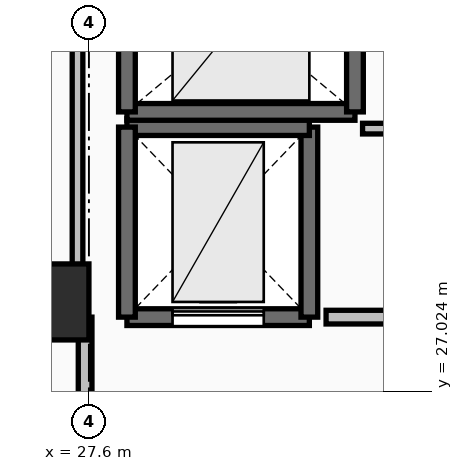
"""IFC4 building model, lengths in metres.
Left out: names, types, materials, properties, quantities, classifications, styles, units other than length and angle.
Written with IfcOpenShell. Run it as: python <this file> out.ifc"""

import sys

from ifc_helpers import new_model, si_unit, direction, frame, frame_2d, origin, origin_2d, place, context, subcontext, project, spatial, rectangle, extrude, element, fill, save


model = new_model("IFC4")
c1 = context("Model", 3, precision=1e-05, world=origin(), true_north=direction((0.0, 1.0)))
c2 = subcontext(c1, "Body", "Model", "MODEL_VIEW")
j1 = project(units=[si_unit("LENGTHUNIT", "METRE"), si_unit("PLANEANGLEUNIT", "RADIAN")], contexts=[c1])
p1 = place(None, origin())
s1 = spatial("IfcSite", under=j1, at=p1, CompositionType="ELEMENT")
p2 = place(p1, origin())
s2 = spatial("IfcBuilding", under=s1, at=p2, CompositionType="ELEMENT")
p3 = place(p2, frame((0.0, 0.0, 221.4)))
s3 = spatial("IfcBuildingStorey", under=s2, at=p3, CompositionType="ELEMENT", Elevation=221.4)
p4 = place(p3, frame((27.25, 28.2, 0.0), z_axis=(0.0, 0.0, 1.0), x_axis=(1.0, 0.0, 0.0)))
e1 = element("IfcColumn", 1, at=p4, inside=s3, PredefinedType="PILASTER", context=c2, shape_type="SweptSolid", body=[
    extrude(rectangle(XDim=0.7, YDim=1.0, at=origin_2d()), origin(), (0.0, 0.0, 1.0), 3.55),
])
p5 = place(p3, frame((28.1, 28.0, 0.0), z_axis=(0.0, 0.0, 1.0), x_axis=(1.0, 0.0, 0.0)))
e2 = element("IfcWall", 2, at=p5, inside=s3, PredefinedType="SHEAR", context=c2, shape_type="SweptSolid", body=[
    extrude(rectangle(XDim=2.4, YDim=0.22, at=frame_2d((1.2, 0.0))), origin(), (0.0, 0.0, 1.0), 3.2),
])
p6 = place(p5, frame((0.6, 0.0, 0.0)))
e3 = element("IfcOpeningElement", 3, at=p6, cuts=e2, PredefinedType="OPENING", context=c2, shape_type="SweptSolid", body=[
    extrude(rectangle(XDim=1.2, YDim=2.2, at=frame_2d((0.6, 1.1))), frame((0.0, 0.125, 0.0), z_axis=(0.0, -1.0, 0.0), x_axis=(1.0, 0.0, 0.0)), (0.0, 0.0, 1.0), 0.25),
])
p7 = place(p3, frame((30.5, 28.0, 0.0), z_axis=(0.0, 0.0, 1.0), x_axis=(0.0, 1.0, 0.0)))
e4 = element("IfcWall", 4, at=p7, inside=s3, PredefinedType="SHEAR", context=c2, shape_type="SweptSolid", body=[
    extrude(rectangle(XDim=2.5, YDim=0.22, at=frame_2d((1.25, 0.0))), origin(), (0.0, 0.0, 1.0), 3.2),
])
p8 = place(p3, frame((30.5, 30.5, 0.0), z_axis=(0.0, 0.0, 1.0), x_axis=(-1.0, 0.0, 0.0)))
e5 = element("IfcWall", 5, at=p8, inside=s3, PredefinedType="SHEAR", context=c2, shape_type="SweptSolid", body=[
    extrude(rectangle(XDim=2.4, YDim=0.22, at=frame_2d((1.2, 0.0))), origin(), (0.0, 0.0, 1.0), 3.2),
])
p9 = place(p3, frame((28.1, 30.5, 0.0), z_axis=(0.0, 0.0, 1.0), x_axis=(0.0, -1.0, 0.0)))
e6 = element("IfcWall", 6, at=p9, inside=s3, PredefinedType="SHEAR", context=c2, shape_type="SweptSolid", body=[
    extrude(rectangle(XDim=2.5, YDim=0.22, at=frame_2d((1.25, 0.0))), origin(), (0.0, 0.0, 1.0), 3.2),
])
p10 = place(p3, frame((28.1, 30.7, 0.0), z_axis=(0.0, 0.0, 1.0), x_axis=(1.0, 0.0, 0.0)))
e7 = element("IfcWall", 7, at=p10, inside=s3, PredefinedType="SOLIDWALL", context=c2, shape_type="SweptSolid", body=[
    extrude(rectangle(XDim=3.0, YDim=0.22, at=frame_2d((1.5, 0.0))), origin(), (0.0, 0.0, 1.0), 3.2),
])
for number, where, z_axis, x_axis in (
    (8, (31.1, 30.7, 0.0), (0.0, 0.0, 1.0), (0.0, 1.0, 0.0)),
    (9, (28.1, 33.2, 0.0), (0.0, 0.0, 1.0), (0.0, -1.0, 0.0)),
):
    element("IfcWall", number, at=place(p3, frame(where, z_axis=z_axis, x_axis=x_axis)), inside=s3, PredefinedType="SOLIDWALL", context=c2, shape_type="SweptSolid", body=[
        extrude(rectangle(XDim=2.5, YDim=0.22, at=frame_2d((1.25, 0.0))), origin(), (0.0, 0.0, 1.0), 3.2),
    ])
p11 = place(p3, frame((27.55, 28.0, 0.0), z_axis=(0.0, 0.0, 1.0), x_axis=(0.0, -1.0, 0.0)))
e10 = element("IfcWall", 10, at=p11, inside=s3, PredefinedType="PARTITIONING", context=c2, shape_type="SweptSolid", body=[
    extrude(rectangle(XDim=4.05, YDim=0.18, at=frame_2d((2.025, 0.0))), origin(), (0.0, 0.0, 1.0), 3.2),
])
p12 = place(p11, frame((1.425, 0.0, 0.0)))
e11 = element("IfcOpeningElement", 11, at=p12, cuts=e10, PredefinedType="OPENING", context=c2, shape_type="SweptSolid", body=[
    extrude(rectangle(XDim=1.2, YDim=2.15, at=frame_2d((0.6, 1.075))), frame((0.0, 0.105, 0.0), z_axis=(0.0, -1.0, 0.0), x_axis=(1.0, 0.0, 0.0)), (0.0, 0.0, 1.0), 0.21),
])
p13 = place(p3, frame((31.635, 28.0, 0.0), z_axis=(0.0, 0.0, 1.0), x_axis=(-1.0, 0.0, 0.0)))
e12 = element("IfcWall", 12, at=p13, inside=s3, PredefinedType="PARTITIONING", context=c2, shape_type="SweptSolid", body=[
    extrude(rectangle(XDim=0.915, YDim=0.18, at=frame_2d((0.458, 0.0))), origin(), (0.0, 0.0, 1.0), 3.2),
])
p14 = place(p3, frame((31.2, 30.48, 0.0), z_axis=(0.0, 0.0, 1.0), x_axis=(1.0, 0.0, 0.0)))
e13 = element("IfcWall", 13, at=p14, inside=s3, PredefinedType="PARTITIONING", context=c2, shape_type="SweptSolid", body=[
    extrude(rectangle(XDim=0.45, YDim=0.14, at=frame_2d((0.225, 0.0))), origin(), (0.0, 0.0, 1.0), 3.2),
])
p15 = place(p3, frame((27.45, 33.45, 0.0), z_axis=(0.0, 0.0, 1.0), x_axis=(0.0, -1.0, 0.0)))
e14 = element("IfcWall", 14, at=p15, inside=s3, PredefinedType="PARTITIONING", context=c2, shape_type="SweptSolid", body=[
    extrude(rectangle(XDim=5.254, YDim=0.14, at=frame_2d((2.627, 0.0))), origin(), (0.0, 0.0, 1.0), 2.392),
])
p16 = place(p6, origin())
e15 = element("IfcDoor", 15, at=p16, inside=s3, OperationType="SLIDING_TO_LEFT", PredefinedType="DOOR", context=c2, shape_type="SweptSolid", body=[
    extrude(rectangle(XDim=1.2, YDim=2.2, at=frame_2d((0.6, 1.1))), frame((0.0, 0.025, 0.0), z_axis=(0.0, -1.0, 0.0), x_axis=(1.0, 0.0, 0.0)), (0.0, 0.0, 1.0), 0.05),
])
fill(e3, e15)
save(model, sys.argv[1])
